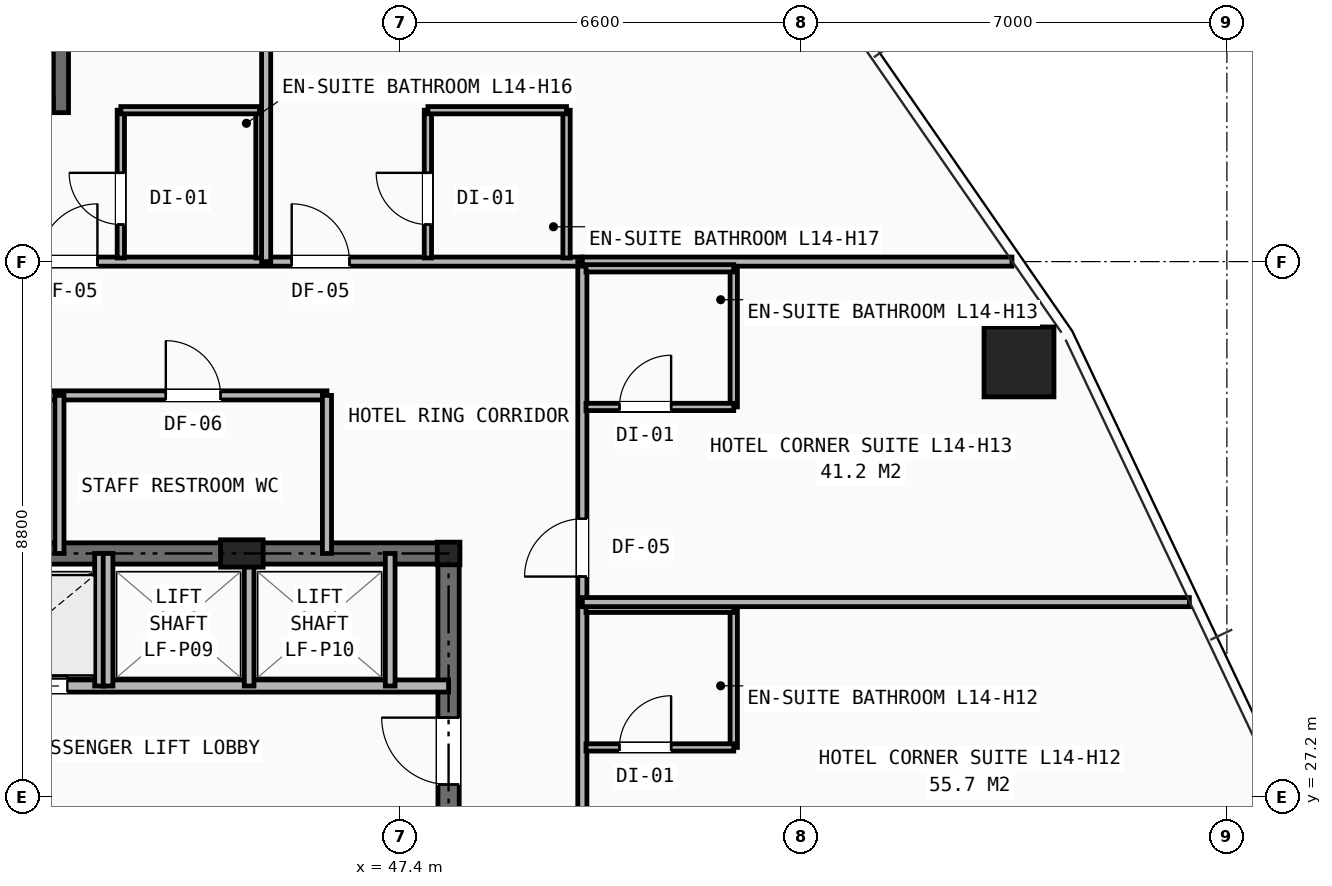
"""IFC4 building model, lengths in metres.
Left out: names, types, materials, properties, quantities, classifications, styles, units other than length and angle.
Written with IfcOpenShell. Run it as: python <this file> out.ifc"""

import sys

from ifc_helpers import new_model, si_unit, direction, frame, frame_2d, origin, origin_2d, place, context, subcontext, project, spatial, rectangle, hollow_rectangle, i_section, extrude, element, fill, save


model = new_model("IFC4")
c1 = context("Model", 3, precision=1e-05, world=origin(), true_north=direction((0.0, 1.0)))
c2 = subcontext(c1, "Body", "Model", "MODEL_VIEW")
j1 = project(units=[si_unit("LENGTHUNIT", "METRE"), si_unit("PLANEANGLEUNIT", "RADIAN")], contexts=[c1])
p1 = place(None, origin())
s1 = spatial("IfcSite", under=j1, at=p1, CompositionType="ELEMENT")
p2 = place(p1, origin())
s2 = spatial("IfcBuilding", under=s1, at=p2, CompositionType="ELEMENT")
p3 = place(p2, frame((0.0, 0.0, 52.8)))
s3 = spatial("IfcBuildingStorey", under=s2, at=p3, CompositionType="ELEMENT", Elevation=52.8)
p4 = place(p3, frame((48.2, 31.2, 0.0), z_axis=(0.0, 0.0, 1.0), x_axis=(1.0, 0.0, 0.0)))
e1 = element("IfcColumn", 1, at=p4, inside=s3, PredefinedType="COLUMN", context=c2, shape_type="SweptSolid", body=[
    extrude(i_section(OverallWidth=0.374, OverallDepth=0.372, WebThickness=0.016, FlangeThickness=0.026, at=origin_2d()), origin(), (0.0, 0.0, 1.0), 3.2),
])
p5 = place(p3, frame((44.8, 31.2, 0.0), z_axis=(0.0, 0.0, 1.0), x_axis=(1.0, 0.0, 0.0)))
e2 = element("IfcColumn", 2, at=p5, inside=s3, PredefinedType="PILASTER", context=c2, shape_type="SweptSolid", body=[
    extrude(rectangle(XDim=0.7, YDim=0.45, at=origin_2d()), origin(), (0.0, 0.0, 1.0), 3.2),
])
p6 = place(p3, frame((57.581, 34.35, 0.0), z_axis=(0.0, 0.0, 1.0), x_axis=(1.0, 0.0, 0.0)))
e3 = element("IfcColumn", 3, at=p6, inside=s3, PredefinedType="COLUMN", context=c2, shape_type="SweptSolid", body=[
    extrude(hollow_rectangle(XDim=1.15, YDim=1.15, WallThickness=0.075, at=origin_2d()), origin(), (0.0, 0.0, 1.0), 3.2),
])
p7 = place(p3, frame((31.8, 31.2, 0.0), z_axis=(0.0, 0.0, 1.0), x_axis=(1.0, 0.0, 0.0)))
e4 = element("IfcWall", 4, at=p7, inside=s3, PredefinedType="SHEAR", context=c2, shape_type="SweptSolid", body=[
    extrude(rectangle(XDim=16.4, YDim=0.35, at=frame_2d((8.2, 0.0))), origin(), (0.0, 0.0, 1.0), 2.98),
])
p8 = place(p3, frame((48.2, 16.4, 0.0), z_axis=(0.0, 0.0, 1.0), x_axis=(0.0, 1.0, 0.0)))
e5 = element("IfcWall", 5, at=p8, inside=s3, PredefinedType="SHEAR", context=c2, shape_type="SweptSolid", body=[
    extrude(rectangle(XDim=14.8, YDim=0.35, at=frame_2d((7.4, 0.0))), origin(), (0.0, 0.0, 1.0), 2.98),
])
p9 = place(p8, frame((11.0, 0.0, 0.0)))
e6 = element("IfcOpeningElement", 6, at=p9, cuts=e5, PredefinedType="OPENING", context=c2, shape_type="SweptSolid", body=[
    extrude(rectangle(XDim=1.1, YDim=2.15, at=frame_2d((0.55, 1.075))), frame((0.0, 0.185, 0.0), z_axis=(0.0, -1.0, 0.0), x_axis=(1.0, 0.0, 0.0)), (0.0, 0.0, 1.0), 0.37),
])
p10 = place(p3, frame((31.8, 29.02, 0.0), z_axis=(0.0, 0.0, 1.0), x_axis=(1.0, 0.0, 0.0)))
e7 = element("IfcWall", 7, at=p10, inside=s3, PredefinedType="SOLIDWALL", context=c2, shape_type="SweptSolid", body=[
    extrude(rectangle(XDim=16.4, YDim=0.2, at=frame_2d((8.2, 0.0))), origin(), (0.0, 0.0, 1.0), 2.431),
])
p11 = place(p10, frame((0.55, 0.0, 0.0)))
e8 = element("IfcOpeningElement", 8, at=p11, cuts=e7, PredefinedType="OPENING", context=c2, shape_type="SweptSolid", body=[
    extrude(rectangle(XDim=0.85, YDim=2.05, at=frame_2d((0.425, 1.025))), frame((0.0, 0.11, 0.0), z_axis=(0.0, -1.0, 0.0), x_axis=(1.0, 0.0, 0.0)), (0.0, 0.0, 1.0), 0.22),
])
p12 = place(p10, frame((2.55, 0.0, 0.0)))
e9 = element("IfcOpeningElement", 9, at=p12, cuts=e7, PredefinedType="OPENING", context=c2, shape_type="SweptSolid", body=[
    extrude(rectangle(XDim=1.1, YDim=2.15, at=frame_2d((0.55, 1.075))), frame((0.0, 0.11, 0.0), z_axis=(0.0, -1.0, 0.0), x_axis=(1.0, 0.0, 0.0)), (0.0, 0.0, 1.0), 0.22),
])
p13 = place(p10, frame((4.71, 0.0, 0.0)))
e10 = element("IfcOpeningElement", 10, at=p13, cuts=e7, PredefinedType="OPENING", context=c2, shape_type="SweptSolid", body=[
    extrude(rectangle(XDim=1.1, YDim=2.15, at=frame_2d((0.55, 1.075))), frame((0.0, 0.11, 0.0), z_axis=(0.0, -1.0, 0.0), x_axis=(1.0, 0.0, 0.0)), (0.0, 0.0, 1.0), 0.22),
])
p14 = place(p10, frame((6.87, 0.0, 0.0)))
e11 = element("IfcOpeningElement", 11, at=p14, cuts=e7, PredefinedType="OPENING", context=c2, shape_type="SweptSolid", body=[
    extrude(rectangle(XDim=1.1, YDim=2.15, at=frame_2d((0.55, 1.075))), frame((0.0, 0.11, 0.0), z_axis=(0.0, -1.0, 0.0), x_axis=(1.0, 0.0, 0.0)), (0.0, 0.0, 1.0), 0.22),
])
p15 = place(p10, frame((9.03, 0.0, 0.0)))
e12 = element("IfcOpeningElement", 12, at=p15, cuts=e7, PredefinedType="OPENING", context=c2, shape_type="SweptSolid", body=[
    extrude(rectangle(XDim=1.1, YDim=2.15, at=frame_2d((0.55, 1.075))), frame((0.0, 0.11, 0.0), z_axis=(0.0, -1.0, 0.0), x_axis=(1.0, 0.0, 0.0)), (0.0, 0.0, 1.0), 0.22),
])
for number, where, z_axis, x_axis in (
    (13, (42.46, 29.02, 0.0), (0.0, 0.0, 1.0), (0.0, 1.0, 0.0)),
    (14, (42.6, 29.02, 0.0), (0.0, 0.0, 1.0), (0.0, 1.0, 0.0)),
    (15, (44.92, 29.02, 0.0), (0.0, 0.0, 1.0), (0.0, 1.0, 0.0)),
    (16, (47.24, 29.02, 0.0), (0.0, 0.0, 1.0), (0.0, 1.0, 0.0)),
):
    element("IfcWall", number, at=place(p3, frame(where, z_axis=z_axis, x_axis=x_axis)), inside=s3, PredefinedType="SOLIDWALL", context=c2, shape_type="SweptSolid", body=[
        extrude(rectangle(XDim=2.18, YDim=0.16, at=frame_2d((1.09, 0.0))), origin(), (0.0, 0.0, 1.0), 2.431),
    ])
p16 = place(p3, frame((33.2, 33.8, 0.0), z_axis=(0.0, 0.0, 1.0), x_axis=(1.0, 0.0, 0.0)))
e17 = element("IfcWall", 17, at=p16, inside=s3, PredefinedType="PARTITIONING", context=c2, shape_type="SweptSolid", body=[
    extrude(rectangle(XDim=13.0, YDim=0.15, at=frame_2d((6.5, 0.0))), origin(), (0.0, 0.0, 1.0), 2.98),
])
p17 = place(p16, frame((1.7, 0.0, 0.0)))
e18 = element("IfcOpeningElement", 18, at=p17, cuts=e17, PredefinedType="OPENING", context=c2, shape_type="SweptSolid", body=[
    extrude(rectangle(XDim=0.9, YDim=2.1, at=frame_2d((0.45, 1.05))), frame((0.0, 0.085, 0.0), z_axis=(0.0, -1.0, 0.0), x_axis=(1.0, 0.0, 0.0)), (0.0, 0.0, 1.0), 0.17),
])
p18 = place(p16, frame((6.0, 0.0, 0.0)))
e19 = element("IfcOpeningElement", 19, at=p18, cuts=e17, PredefinedType="OPENING", context=c2, shape_type="SweptSolid", body=[
    extrude(rectangle(XDim=0.9, YDim=2.1, at=frame_2d((0.45, 1.05))), frame((0.0, 0.085, 0.0), z_axis=(0.0, -1.0, 0.0), x_axis=(1.0, 0.0, 0.0)), (0.0, 0.0, 1.0), 0.17),
])
p19 = place(p16, frame((10.35, 0.0, 0.0)))
e20 = element("IfcOpeningElement", 20, at=p19, cuts=e17, PredefinedType="OPENING", context=c2, shape_type="SweptSolid", body=[
    extrude(rectangle(XDim=0.9, YDim=2.1, at=frame_2d((0.45, 1.05))), frame((0.0, 0.085, 0.0), z_axis=(0.0, -1.0, 0.0), x_axis=(1.0, 0.0, 0.0)), (0.0, 0.0, 1.0), 0.17),
])
for number, where, z_axis, x_axis in (
    (21, (46.2, 31.2, 0.0), (0.0, 0.0, 1.0), (0.0, 1.0, 0.0)),
    (22, (41.8, 31.2, 0.0), (0.0, 0.0, 1.0), (0.0, 1.0, 0.0)),
):
    element("IfcWall", number, at=place(p3, frame(where, z_axis=z_axis, x_axis=x_axis)), inside=s3, PredefinedType="PARTITIONING", context=c2, shape_type="SweptSolid", body=[
        extrude(rectangle(XDim=2.6, YDim=0.15, at=frame_2d((1.3, 0.0))), origin(), (0.0, 0.0, 1.0), 2.431),
    ])
p20 = place(p3, frame((41.275, 36.0, 0.0), z_axis=(0.0, 0.0, 1.0), x_axis=(1.0, 0.0, 0.0)))
e23 = element("IfcWall", 23, at=p20, inside=s3, PredefinedType="PARTITIONING", context=c2, shape_type="SweptSolid", body=[
    extrude(rectangle(XDim=9.125, YDim=0.15, at=frame_2d((4.562, 0.0))), origin(), (0.0, 0.0, 1.0), 2.513),
])
p21 = place(p20, frame((0.2, 0.0, 0.0)))
e24 = element("IfcOpeningElement", 24, at=p21, cuts=e23, PredefinedType="OPENING", context=c2, shape_type="SweptSolid", body=[
    extrude(rectangle(XDim=0.95, YDim=2.1, at=frame_2d((0.475, 1.05))), frame((0.0, 0.085, 0.0), z_axis=(0.0, -1.0, 0.0), x_axis=(1.0, 0.0, 0.0)), (0.0, 0.0, 1.0), 0.17),
])
p22 = place(p20, frame((4.345, 0.0, 0.0)))
e25 = element("IfcOpeningElement", 25, at=p22, cuts=e23, PredefinedType="OPENING", context=c2, shape_type="SweptSolid", body=[
    extrude(rectangle(XDim=0.95, YDim=2.1, at=frame_2d((0.475, 1.05))), frame((0.0, 0.085, 0.0), z_axis=(0.0, -1.0, 0.0), x_axis=(1.0, 0.0, 0.0)), (0.0, 0.0, 1.0), 0.17),
])
p23 = place(p3, frame((50.4, 14.1, 0.0), z_axis=(0.0, 0.0, 1.0), x_axis=(0.0, 1.0, 0.0)))
e26 = element("IfcWall", 26, at=p23, inside=s3, PredefinedType="PARTITIONING", context=c2, shape_type="SweptSolid", body=[
    extrude(rectangle(XDim=21.9, YDim=0.15, at=frame_2d((10.95, 0.0))), origin(), (0.0, 0.0, 1.0), 2.191),
])
p24 = place(p23, frame((0.42, 0.0, 0.0)))
e27 = element("IfcOpeningElement", 27, at=p24, cuts=e26, PredefinedType="OPENING", context=c2, shape_type="SweptSolid", body=[
    extrude(rectangle(XDim=0.95, YDim=2.1, at=frame_2d((0.475, 1.05))), frame((0.0, 0.085, 0.0), z_axis=(0.0, -1.0, 0.0), x_axis=(1.0, 0.0, 0.0)), (0.0, 0.0, 1.0), 0.17),
])
p25 = place(p23, frame((5.72, 0.0, 0.0)))
e28 = element("IfcOpeningElement", 28, at=p25, cuts=e26, PredefinedType="OPENING", context=c2, shape_type="SweptSolid", body=[
    extrude(rectangle(XDim=0.95, YDim=2.1, at=frame_2d((0.475, 1.05))), frame((0.0, 0.085, 0.0), z_axis=(0.0, -1.0, 0.0), x_axis=(1.0, 0.0, 0.0)), (0.0, 0.0, 1.0), 0.17),
])
p26 = place(p23, frame((11.12, 0.0, 0.0)))
e29 = element("IfcOpeningElement", 29, at=p26, cuts=e26, PredefinedType="OPENING", context=c2, shape_type="SweptSolid", body=[
    extrude(rectangle(XDim=0.95, YDim=2.1, at=frame_2d((0.475, 1.05))), frame((0.0, 0.085, 0.0), z_axis=(0.0, -1.0, 0.0), x_axis=(1.0, 0.0, 0.0)), (0.0, 0.0, 1.0), 0.17),
])
p27 = place(p23, frame((16.72, 0.0, 0.0)))
e30 = element("IfcOpeningElement", 30, at=p27, cuts=e26, PredefinedType="OPENING", context=c2, shape_type="SweptSolid", body=[
    extrude(rectangle(XDim=0.95, YDim=2.1, at=frame_2d((0.475, 1.05))), frame((0.0, 0.085, 0.0), z_axis=(0.0, -1.0, 0.0), x_axis=(1.0, 0.0, 0.0)), (0.0, 0.0, 1.0), 0.17),
])
p28 = place(p3, frame((50.4, 36.0, 0.0), z_axis=(0.0, 0.0, 1.0), x_axis=(1.0, 0.0, 0.0)))
e31 = element("IfcWall", 31, at=p28, inside=s3, PredefinedType="PARTITIONING", context=c2, shape_type="SweptSolid", body=[
    extrude(rectangle(XDim=7.065, YDim=0.15, at=frame_2d((3.533, 0.0))), origin(), (0.0, 0.0, 1.0), 2.268),
])
p29 = place(p3, frame((52.89, 28.01, 0.0), z_axis=(0.0, 0.0, 1.0), x_axis=(0.0, 1.0, 0.0)))
e32 = element("IfcWall", 32, at=p29, inside=s3, PredefinedType="PARTITIONING", context=c2, shape_type="SweptSolid", body=[
    extrude(rectangle(XDim=2.28, YDim=0.12, at=frame_2d((1.14, 0.0))), origin(), (0.0, 0.0, 1.0), 2.98),
])
p30 = place(p3, frame((50.46, 28.01, 0.0), z_axis=(0.0, 0.0, 1.0), x_axis=(1.0, 0.0, 0.0)))
e33 = element("IfcWall", 33, at=p30, inside=s3, PredefinedType="PARTITIONING", context=c2, shape_type="SweptSolid", body=[
    extrude(rectangle(XDim=2.43, YDim=0.12, at=frame_2d((1.215, 0.0))), origin(), (0.0, 0.0, 1.0), 2.98),
])
p31 = place(p30, frame((0.55, 0.0, 0.0)))
e34 = element("IfcOpeningElement", 34, at=p31, cuts=e33, PredefinedType="OPENING", context=c2, shape_type="SweptSolid", body=[
    extrude(rectangle(XDim=0.85, YDim=2.05, at=frame_2d((0.425, 1.025))), frame((0.0, 0.07, 0.0), z_axis=(0.0, -1.0, 0.0), x_axis=(1.0, 0.0, 0.0)), (0.0, 0.0, 1.0), 0.14),
])
p32 = place(p3, frame((50.46, 30.29, 0.0), z_axis=(0.0, 0.0, 1.0), x_axis=(1.0, 0.0, 0.0)))
e35 = element("IfcWall", 35, at=p32, inside=s3, PredefinedType="PARTITIONING", context=c2, shape_type="SweptSolid", body=[
    extrude(rectangle(XDim=2.43, YDim=0.12, at=frame_2d((1.215, 0.0))), origin(), (0.0, 0.0, 1.0), 2.98),
])
p33 = place(p3, frame((50.4, 30.4, 0.0), z_axis=(0.0, 0.0, 1.0), x_axis=(1.0, 0.0, 0.0)))
e36 = element("IfcWall", 36, at=p33, inside=s3, PredefinedType="PARTITIONING", context=c2, shape_type="SweptSolid", body=[
    extrude(rectangle(XDim=9.983, YDim=0.15, at=frame_2d((4.992, 0.0))), origin(), (0.0, 0.0, 1.0), 2.268),
])
p34 = place(p3, frame((52.89, 33.61, 0.0), z_axis=(0.0, 0.0, 1.0), x_axis=(0.0, 1.0, 0.0)))
e37 = element("IfcWall", 37, at=p34, inside=s3, PredefinedType="PARTITIONING", context=c2, shape_type="SweptSolid", body=[
    extrude(rectangle(XDim=2.28, YDim=0.12, at=frame_2d((1.14, 0.0))), origin(), (0.0, 0.0, 1.0), 2.98),
])
p35 = place(p3, frame((50.46, 33.61, 0.0), z_axis=(0.0, 0.0, 1.0), x_axis=(1.0, 0.0, 0.0)))
e38 = element("IfcWall", 38, at=p35, inside=s3, PredefinedType="PARTITIONING", context=c2, shape_type="SweptSolid", body=[
    extrude(rectangle(XDim=2.43, YDim=0.12, at=frame_2d((1.215, 0.0))), origin(), (0.0, 0.0, 1.0), 2.513),
])
p36 = place(p35, frame((0.55, 0.0, 0.0)))
e39 = element("IfcOpeningElement", 39, at=p36, cuts=e38, PredefinedType="OPENING", context=c2, shape_type="SweptSolid", body=[
    extrude(rectangle(XDim=0.85, YDim=2.05, at=frame_2d((0.425, 1.025))), frame((0.0, 0.07, 0.0), z_axis=(0.0, -1.0, 0.0), x_axis=(1.0, 0.0, 0.0)), (0.0, 0.0, 1.0), 0.14),
])
p37 = place(p3, frame((50.46, 35.89, 0.0), z_axis=(0.0, 0.0, 1.0), x_axis=(1.0, 0.0, 0.0)))
e40 = element("IfcWall", 40, at=p37, inside=s3, PredefinedType="PARTITIONING", context=c2, shape_type="SweptSolid", body=[
    extrude(rectangle(XDim=2.43, YDim=0.12, at=frame_2d((1.215, 0.0))), origin(), (0.0, 0.0, 1.0), 2.513),
])
p38 = place(p3, frame((42.81, 36.06, 0.0), z_axis=(0.0, 0.0, 1.0), x_axis=(0.0, 1.0, 0.0)))
e41 = element("IfcWall", 41, at=p38, inside=s3, PredefinedType="PARTITIONING", context=c2, shape_type="SweptSolid", body=[
    extrude(rectangle(XDim=2.43, YDim=0.12, at=frame_2d((1.215, 0.0))), origin(), (0.0, 0.0, 1.0), 2.98),
])
p39 = place(p38, frame((0.55, 0.0, 0.0)))
e42 = element("IfcOpeningElement", 42, at=p39, cuts=e41, PredefinedType="OPENING", context=c2, shape_type="SweptSolid", body=[
    extrude(rectangle(XDim=0.85, YDim=2.05, at=frame_2d((0.425, 1.025))), frame((0.0, 0.07, 0.0), z_axis=(0.0, -1.0, 0.0), x_axis=(1.0, 0.0, 0.0)), (0.0, 0.0, 1.0), 0.14),
])
p40 = place(p3, frame((45.09, 36.06, 0.0), z_axis=(0.0, 0.0, 1.0), x_axis=(0.0, 1.0, 0.0)))
e43 = element("IfcWall", 43, at=p40, inside=s3, PredefinedType="PARTITIONING", context=c2, shape_type="SweptSolid", body=[
    extrude(rectangle(XDim=2.43, YDim=0.12, at=frame_2d((1.215, 0.0))), origin(), (0.0, 0.0, 1.0), 2.98),
])
p41 = place(p3, frame((42.81, 38.49, 0.0), z_axis=(0.0, 0.0, 1.0), x_axis=(1.0, 0.0, 0.0)))
e44 = element("IfcWall", 44, at=p41, inside=s3, PredefinedType="PARTITIONING", context=c2, shape_type="SweptSolid", body=[
    extrude(rectangle(XDim=2.28, YDim=0.12, at=frame_2d((1.14, 0.0))), origin(), (0.0, 0.0, 1.0), 2.98),
])
p42 = place(p3, frame((45.2, 36.0, 0.0), z_axis=(0.0, 0.0, 1.0), x_axis=(0.0, 1.0, 0.0)))
e45 = element("IfcWall", 45, at=p42, inside=s3, PredefinedType="PARTITIONING", context=c2, shape_type="SweptSolid", body=[
    extrude(rectangle(XDim=17.724, YDim=0.15, at=frame_2d((8.862, 0.0))), origin(), (0.0, 0.0, 1.0), 2.191),
])
p43 = place(p3, frame((47.86, 36.06, 0.0), z_axis=(0.0, 0.0, 1.0), x_axis=(0.0, 1.0, 0.0)))
e46 = element("IfcWall", 46, at=p43, inside=s3, PredefinedType="PARTITIONING", context=c2, shape_type="SweptSolid", body=[
    extrude(rectangle(XDim=2.43, YDim=0.12, at=frame_2d((1.215, 0.0))), origin(), (0.0, 0.0, 1.0), 2.98),
])
p44 = place(p43, frame((0.55, 0.0, 0.0)))
e47 = element("IfcOpeningElement", 47, at=p44, cuts=e46, PredefinedType="OPENING", context=c2, shape_type="SweptSolid", body=[
    extrude(rectangle(XDim=0.85, YDim=2.05, at=frame_2d((0.425, 1.025))), frame((0.0, 0.07, 0.0), z_axis=(0.0, -1.0, 0.0), x_axis=(1.0, 0.0, 0.0)), (0.0, 0.0, 1.0), 0.14),
])
p45 = place(p3, frame((50.14, 36.06, 0.0), z_axis=(0.0, 0.0, 1.0), x_axis=(0.0, 1.0, 0.0)))
e48 = element("IfcWall", 48, at=p45, inside=s3, PredefinedType="PARTITIONING", context=c2, shape_type="SweptSolid", body=[
    extrude(rectangle(XDim=2.43, YDim=0.12, at=frame_2d((1.215, 0.0))), origin(), (0.0, 0.0, 1.0), 2.513),
])
p46 = place(p3, frame((47.86, 38.49, 0.0), z_axis=(0.0, 0.0, 1.0), x_axis=(1.0, 0.0, 0.0)))
e49 = element("IfcWall", 49, at=p46, inside=s3, PredefinedType="PARTITIONING", context=c2, shape_type="SweptSolid", body=[
    extrude(rectangle(XDim=2.28, YDim=0.12, at=frame_2d((1.14, 0.0))), origin(), (0.0, 0.0, 1.0), 2.513),
])
p47 = place(p3, frame((41.825, 38.45, 0.0), z_axis=(0.0, 0.0, 1.0), x_axis=(0.0, 1.0, 0.0)))
e50 = element("IfcWall", 50, at=p47, inside=s3, PredefinedType="SHEAR", context=c2, shape_type="SweptSolid", body=[
    extrude(rectangle(XDim=8.55, YDim=0.25, at=frame_2d((4.275, 0.0))), origin(), (0.0, 0.0, 1.0), 2.98),
])
p48 = place(p3, frame((38.3, 38.575, 0.0), z_axis=(0.0, 0.0, 1.0), x_axis=(1.0, 0.0, 0.0)))
e51 = element("IfcWall", 51, at=p48, inside=s3, PredefinedType="SHEAR", context=c2, shape_type="SweptSolid", body=[
    extrude(rectangle(XDim=3.4, YDim=0.25, at=frame_2d((1.7, 0.0))), origin(), (0.0, 0.0, 1.0), 2.98),
])
p49 = place(p48, frame((1.75, 0.0, 0.0)))
e52 = element("IfcOpeningElement", 52, at=p49, cuts=e51, PredefinedType="OPENING", context=c2, shape_type="SweptSolid", body=[
    extrude(rectangle(XDim=0.95, YDim=2.1, at=frame_2d((0.475, 1.05))), frame((0.0, 0.135, 0.0), z_axis=(0.0, -1.0, 0.0), x_axis=(1.0, 0.0, 0.0)), (0.0, 0.0, 1.0), 0.27),
])
p50 = place(p9, origin())
e53 = element("IfcDoor", 53, at=p50, inside=s3, OperationType="SINGLE_SWING_RIGHT", PredefinedType="DOOR", context=c2, shape_type="SweptSolid", body=[
    extrude(rectangle(XDim=1.1, YDim=2.15, at=frame_2d((0.55, 1.075))), frame((0.0, 0.025, 0.0), z_axis=(0.0, -1.0, 0.0), x_axis=(1.0, 0.0, 0.0)), (0.0, 0.0, 1.0), 0.05),
])
fill(e6, e53)
p51 = place(p15, origin())
e54 = element("IfcDoor", 54, at=p51, inside=s3, OperationType="DOUBLE_DOOR_SLIDING", PredefinedType="DOOR", context=c2, shape_type="SweptSolid", body=[
    extrude(rectangle(XDim=1.1, YDim=2.15, at=frame_2d((0.55, 1.075))), frame((0.0, 0.025, 0.0), z_axis=(0.0, -1.0, 0.0), x_axis=(1.0, 0.0, 0.0)), (0.0, 0.0, 1.0), 0.05),
])
fill(e12, e54)
p52 = place(p19, origin())
e55 = element("IfcDoor", 55, at=p52, inside=s3, OperationType="SINGLE_SWING_LEFT", PredefinedType="DOOR", context=c2, shape_type="SweptSolid", body=[
    extrude(rectangle(XDim=0.9, YDim=2.1, at=frame_2d((0.45, 1.05))), frame((0.0, 0.025, 0.0), z_axis=(0.0, -1.0, 0.0), x_axis=(1.0, 0.0, 0.0)), (0.0, 0.0, 1.0), 0.05),
])
fill(e20, e55)
p53 = place(p31, origin())
e56 = element("IfcDoor", 56, at=p53, inside=s3, OperationType="SINGLE_SWING_RIGHT", PredefinedType="DOOR", context=c2, shape_type="SweptSolid", body=[
    extrude(rectangle(XDim=0.85, YDim=2.05, at=frame_2d((0.425, 1.025))), frame((0.0, 0.025, 0.0), z_axis=(0.0, -1.0, 0.0), x_axis=(1.0, 0.0, 0.0)), (0.0, 0.0, 1.0), 0.05),
])
fill(e34, e56)
p54 = place(p27, origin())
e57 = element("IfcDoor", 57, at=p54, inside=s3, OperationType="SINGLE_SWING_LEFT", PredefinedType="DOOR", context=c2, shape_type="SweptSolid", body=[
    extrude(rectangle(XDim=0.95, YDim=2.1, at=frame_2d((0.475, 1.05))), frame((0.0, 0.025, 0.0), z_axis=(0.0, -1.0, 0.0), x_axis=(1.0, 0.0, 0.0)), (0.0, 0.0, 1.0), 0.05),
])
fill(e30, e57)
p55 = place(p36, origin())
e58 = element("IfcDoor", 58, at=p55, inside=s3, OperationType="SINGLE_SWING_RIGHT", PredefinedType="DOOR", context=c2, shape_type="SweptSolid", body=[
    extrude(rectangle(XDim=0.85, YDim=2.05, at=frame_2d((0.425, 1.025))), frame((0.0, 0.025, 0.0), z_axis=(0.0, -1.0, 0.0), x_axis=(1.0, 0.0, 0.0)), (0.0, 0.0, 1.0), 0.05),
])
fill(e39, e58)
p56 = place(p21, origin())
e59 = element("IfcDoor", 59, at=p56, inside=s3, OperationType="SINGLE_SWING_RIGHT", PredefinedType="DOOR", context=c2, shape_type="SweptSolid", body=[
    extrude(rectangle(XDim=0.95, YDim=2.1, at=frame_2d((0.475, 1.05))), frame((0.0, 0.025, 0.0), z_axis=(0.0, -1.0, 0.0), x_axis=(1.0, 0.0, 0.0)), (0.0, 0.0, 1.0), 0.05),
])
fill(e24, e59)
p57 = place(p39, origin())
e60 = element("IfcDoor", 60, at=p57, inside=s3, OperationType="SINGLE_SWING_RIGHT", PredefinedType="DOOR", context=c2, shape_type="SweptSolid", body=[
    extrude(rectangle(XDim=0.85, YDim=2.05, at=frame_2d((0.425, 1.025))), frame((0.0, 0.025, 0.0), z_axis=(0.0, -1.0, 0.0), x_axis=(1.0, 0.0, 0.0)), (0.0, 0.0, 1.0), 0.05),
])
fill(e42, e60)
p58 = place(p22, origin())
e61 = element("IfcDoor", 61, at=p58, inside=s3, OperationType="SINGLE_SWING_LEFT", PredefinedType="DOOR", context=c2, shape_type="SweptSolid", body=[
    extrude(rectangle(XDim=0.95, YDim=2.1, at=frame_2d((0.475, 1.05))), frame((0.0, 0.025, 0.0), z_axis=(0.0, -1.0, 0.0), x_axis=(1.0, 0.0, 0.0)), (0.0, 0.0, 1.0), 0.05),
])
fill(e25, e61)
p59 = place(p44, origin())
e62 = element("IfcDoor", 62, at=p59, inside=s3, OperationType="SINGLE_SWING_RIGHT", PredefinedType="DOOR", context=c2, shape_type="SweptSolid", body=[
    extrude(rectangle(XDim=0.85, YDim=2.05, at=frame_2d((0.425, 1.025))), frame((0.0, 0.025, 0.0), z_axis=(0.0, -1.0, 0.0), x_axis=(1.0, 0.0, 0.0)), (0.0, 0.0, 1.0), 0.05),
])
fill(e47, e62)
save(model, sys.argv[1])
